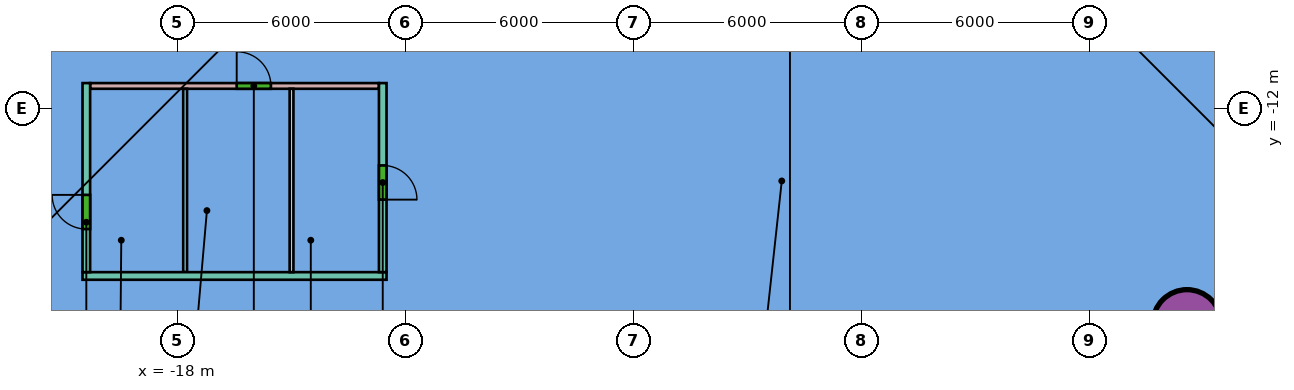
"""IFC4 building model, lengths in metres.
Left out: names, types, materials, properties, quantities, classifications, styles, units other than length and angle.
Written with IfcOpenShell. Run it as: python <this file> out.ifc"""

import sys

from ifc_helpers import new_model, si_unit, direction, frame, frame_2d, origin, origin_2d, place, context, subcontext, project, spatial, rectangle, hollow_circle, extrude, element, fill, save


model = new_model("IFC4")
c1 = context("Model", 3, precision=1e-05, world=origin(), true_north=direction((0.0, 1.0)))
c2 = subcontext(c1, "Body", "Model", "MODEL_VIEW")
j1 = project(units=[si_unit("LENGTHUNIT", "METRE"), si_unit("PLANEANGLEUNIT", "RADIAN")], contexts=[c1])
p1 = place(None, origin())
s1 = spatial("IfcSite", under=j1, at=p1, CompositionType="ELEMENT")
p2 = place(p1, origin())
s2 = spatial("IfcBuilding", under=s1, at=p2, CompositionType="ELEMENT")
p3 = place(p2, frame((0.0, 0.0, 84.1)))
s3 = spatial("IfcBuildingStorey", under=s2, at=p3, CompositionType="ELEMENT", Elevation=84.1)
p4 = place(p3, frame((8.563, -17.66, 0.0), z_axis=(0.0, 0.0, 1.0), x_axis=(1.0, 0.0, 0.0)))
e1 = element("IfcColumn", 1, at=p4, inside=s3, PredefinedType="COLUMN", context=c2, shape_type="SweptSolid", body=[
    extrude(hollow_circle(Radius=0.9, WallThickness=0.06, at=origin_2d()), origin(), (0.0, 0.0, 1.0), 4.35),
])
p5 = place(p3, frame((-20.3, -11.4, 0.0), z_axis=(0.0, 0.0, 1.0), x_axis=(1.0, 0.0, 0.0)))
e2 = element("IfcWall", 2, at=p5, inside=s3, PredefinedType="PARTITIONING", context=c2, shape_type="SweptSolid", body=[
    extrude(rectangle(XDim=7.6, YDim=0.15, at=frame_2d((3.8, 0.0))), origin(), (0.0, 0.0, 1.0), 3.65),
])
p6 = place(p5, frame((3.857, 0.0, 0.0)))
e3 = element("IfcOpeningElement", 3, at=p6, cuts=e2, PredefinedType="OPENING", context=c2, shape_type="SweptSolid", body=[
    extrude(rectangle(XDim=0.9, YDim=2.1, at=frame_2d((0.45, 1.05))), frame((0.0, 0.085, 0.0), z_axis=(0.0, -1.0, 0.0), x_axis=(1.0, 0.0, 0.0)), (0.0, 0.0, 1.0), 0.17),
])
p7 = place(p3, frame((-17.8, -16.3, 0.0), z_axis=(0.0, 0.0, 1.0), x_axis=(0.0, 1.0, 0.0)))
e4 = element("IfcWall", 4, at=p7, inside=s3, PredefinedType="PARTITIONING", context=c2, shape_type="SweptSolid", body=[
    extrude(rectangle(XDim=4.825, YDim=0.1, at=frame_2d((2.413, 0.0))), origin(), (0.0, 0.0, 1.0), 3.65),
])
p8 = place(p3, frame((-20.5, -16.4, 0.0), z_axis=(0.0, 0.0, 1.0), x_axis=(1.0, 0.0, 0.0)))
e5 = element("IfcWall", 5, at=p8, inside=s3, PredefinedType="PARTITIONING", context=c2, shape_type="SweptSolid", body=[
    extrude(rectangle(XDim=8.0, YDim=0.2, at=frame_2d((4.0, 0.0))), origin(), (0.0, 0.0, 1.0), 3.65),
])
p9 = place(p3, frame((-20.4, -16.3, 0.0), z_axis=(0.0, 0.0, 1.0), x_axis=(0.0, 1.0, 0.0)))
e6 = element("IfcWall", 6, at=p9, inside=s3, PredefinedType="PARTITIONING", context=c2, shape_type="SweptSolid", body=[
    extrude(rectangle(XDim=4.975, YDim=0.2, at=frame_2d((2.488, 0.0))), origin(), (0.0, 0.0, 1.0), 3.65),
])
p10 = place(p9, frame((1.133, 0.0, 0.0)))
e7 = element("IfcOpeningElement", 7, at=p10, cuts=e6, PredefinedType="OPENING", context=c2, shape_type="SweptSolid", body=[
    extrude(rectangle(XDim=0.9, YDim=2.1, at=frame_2d((0.45, 1.05))), frame((0.0, 0.11, 0.0), z_axis=(0.0, -1.0, 0.0), x_axis=(1.0, 0.0, 0.0)), (0.0, 0.0, 1.0), 0.22),
])
p11 = place(p3, frame((-15.0, -16.3, 0.0), z_axis=(0.0, 0.0, 1.0), x_axis=(0.0, 1.0, 0.0)))
e8 = element("IfcWall", 8, at=p11, inside=s3, PredefinedType="PARTITIONING", context=c2, shape_type="SweptSolid", body=[
    extrude(rectangle(XDim=4.825, YDim=0.1, at=frame_2d((2.413, 0.0))), origin(), (0.0, 0.0, 1.0), 3.65),
])
p12 = place(p3, frame((-12.6, -11.325, 0.0), z_axis=(0.0, 0.0, 1.0), x_axis=(0.0, -1.0, 0.0)))
e9 = element("IfcWall", 9, at=p12, inside=s3, PredefinedType="PARTITIONING", context=c2, shape_type="SweptSolid", body=[
    extrude(rectangle(XDim=4.975, YDim=0.2, at=frame_2d((2.488, 0.0))), origin(), (0.0, 0.0, 1.0), 3.65),
])
p13 = place(p12, frame((2.167, 0.0, 0.0)))
e10 = element("IfcOpeningElement", 10, at=p13, cuts=e9, PredefinedType="OPENING", context=c2, shape_type="SweptSolid", body=[
    extrude(rectangle(XDim=0.9, YDim=2.1, at=frame_2d((0.45, 1.05))), frame((0.0, 0.11, 0.0), z_axis=(0.0, -1.0, 0.0), x_axis=(1.0, 0.0, 0.0)), (0.0, 0.0, 1.0), 0.22),
])
p14 = place(p3, frame((9.273, -18.58, 0.0), z_axis=(0.0, 0.0, 1.0), x_axis=(0.824269010653, 0.566198373432, 0.0)))
e11 = element("IfcWall", 11, at=p14, inside=s3, PredefinedType="SOLIDWALL", context=c2, shape_type="SweptSolid", body=[
    extrude(rectangle(XDim=3.575, YDim=0.25, at=frame_2d((1.788, 0.0))), origin(), (0.0, 0.0, 1.0), 3.95),
])
p15 = place(p6, origin())
e12 = element("IfcDoor", 12, at=p15, inside=s3, OperationType="SINGLE_SWING_LEFT", PredefinedType="DOOR", context=c2, shape_type="SweptSolid", body=[
    extrude(rectangle(XDim=0.9, YDim=2.1, at=frame_2d((0.45, 1.05))), frame((0.0, 0.025, 0.0), z_axis=(0.0, -1.0, 0.0), x_axis=(1.0, 0.0, 0.0)), (0.0, 0.0, 1.0), 0.05),
])
fill(e3, e12)
p16 = place(p10, origin())
e13 = element("IfcDoor", 13, at=p16, inside=s3, OperationType="SINGLE_SWING_RIGHT", PredefinedType="DOOR", context=c2, shape_type="SweptSolid", body=[
    extrude(rectangle(XDim=0.9, YDim=2.1, at=frame_2d((0.45, 1.05))), frame((0.0, 0.025, 0.0), z_axis=(0.0, -1.0, 0.0), x_axis=(1.0, 0.0, 0.0)), (0.0, 0.0, 1.0), 0.05),
])
fill(e7, e13)
p17 = place(p13, origin())
e14 = element("IfcDoor", 14, at=p17, inside=s3, OperationType="SINGLE_SWING_RIGHT", PredefinedType="DOOR", context=c2, shape_type="SweptSolid", body=[
    extrude(rectangle(XDim=0.9, YDim=2.1, at=frame_2d((0.45, 1.05))), frame((0.0, 0.025, 0.0), z_axis=(0.0, -1.0, 0.0), x_axis=(1.0, 0.0, 0.0)), (0.0, 0.0, 1.0), 0.05),
])
fill(e10, e14)
save(model, sys.argv[1])
